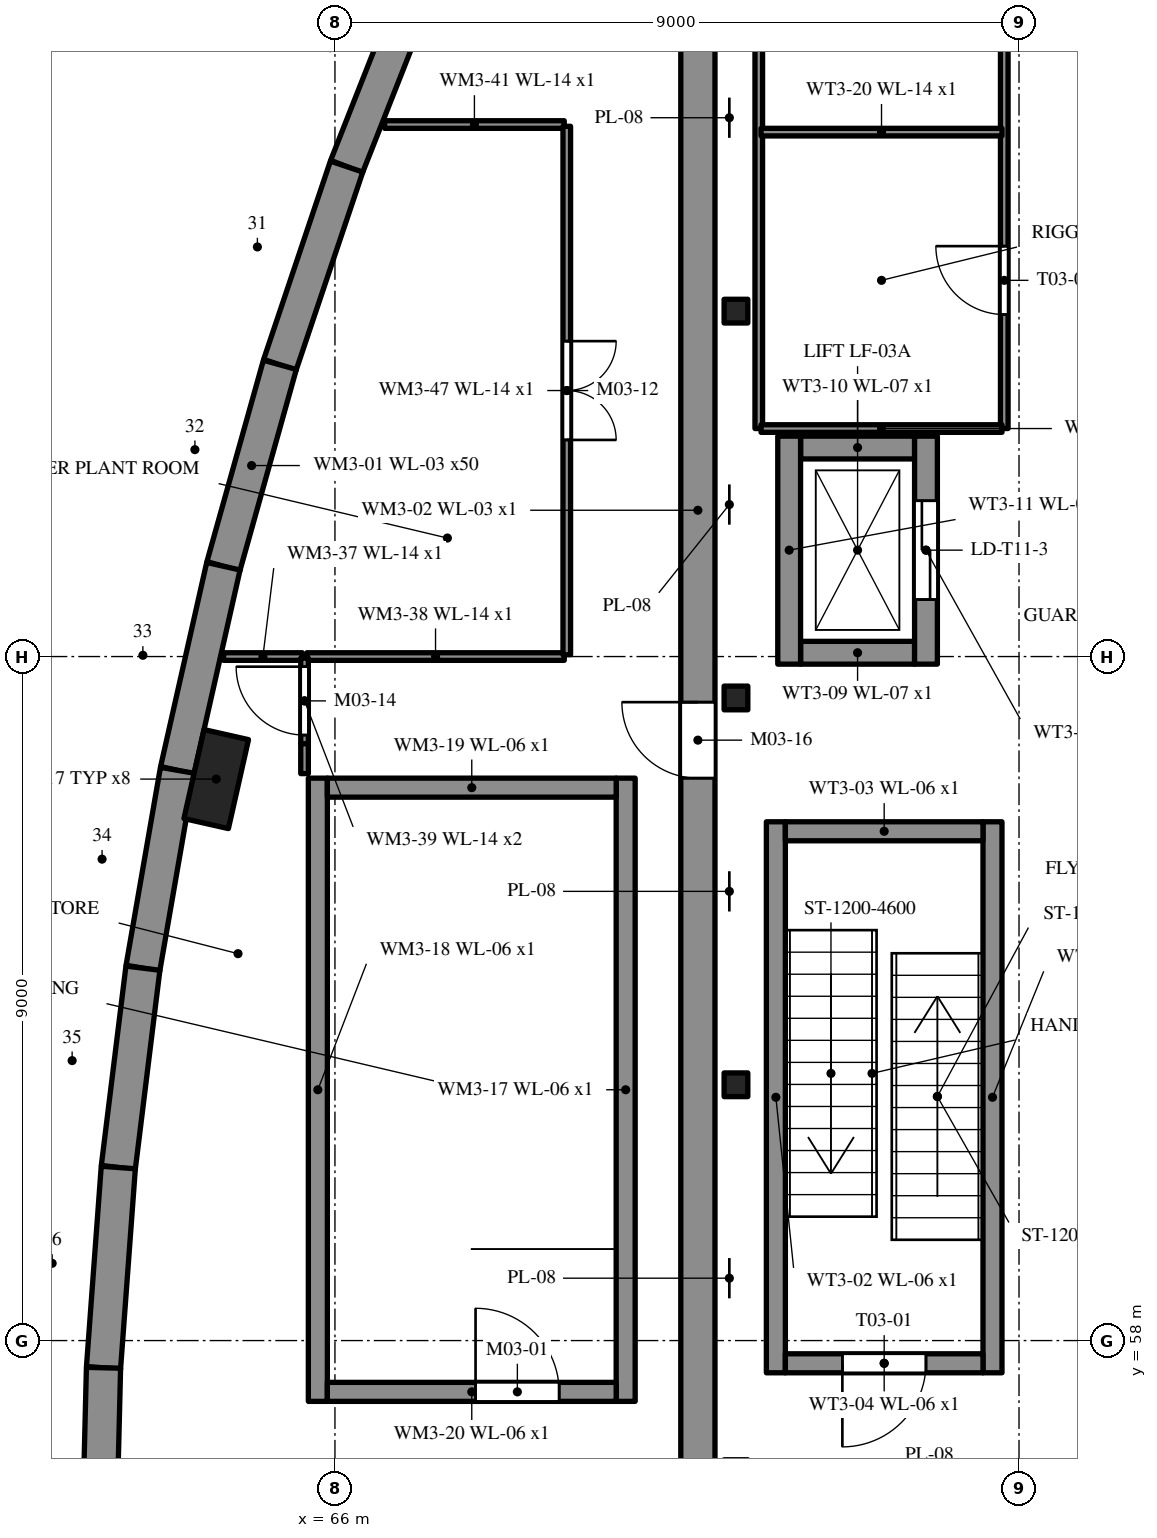
"""IFC4 building model, lengths in metres.
Left out: names, types, materials, properties, quantities, classifications, styles, units other than length and angle.
Written with IfcOpenShell. Run it as: python <this file> out.ifc"""

import sys

from ifc_helpers import new_model, si_unit, direction, frame, frame_2d, origin, origin_2d, place, context, subcontext, project, spatial, polyline, rectangle, i_section, outline, extrude, element, fill, save


model = new_model("IFC4")
c1 = context("Model", 3, precision=1e-05, world=origin(), true_north=direction((0.0, 1.0)))
c2 = subcontext(c1, "Body", "Model", "MODEL_VIEW")
j1 = project(units=[si_unit("LENGTHUNIT", "METRE"), si_unit("PLANEANGLEUNIT", "RADIAN")], contexts=[c1])
p1 = place(None, origin())
s1 = spatial("IfcSite", under=j1, at=p1, CompositionType="ELEMENT")
p2 = place(p1, origin())
s2 = spatial("IfcBuilding", under=s1, at=p2, CompositionType="ELEMENT")
p3 = place(p2, frame((0.0, 0.0, 14.8)))
s3 = spatial("IfcBuildingStorey", under=s2, at=p3, CompositionType="ELEMENT", Elevation=14.8)
p4 = place(p3, frame((67.163, 76.007, 0.0), z_axis=(0.0, 0.0, 1.0), x_axis=(-0.366920100653, -0.930252460215, 0.0)))
e1 = element("IfcWall", 1, at=p4, inside=s3, PredefinedType="SOLIDWALL", context=c2, shape_type="SweptSolid", body=[
    extrude(outline(polyline([(0.0, 0.0), (2.752, 0.0), (2.752, 2.931), (2.624, 2.973), (0.194, 3.768), (0.105, 3.797), (0.0, 3.742), (0.0, 0.0)])), frame((0.0, 0.225, 0.0), z_axis=(0.0, -1.0, 0.0), x_axis=(1.0, 0.0, 0.0)), (0.0, 0.0, 1.0), 0.45),
])
p5 = place(p3, frame((66.153, 73.447, 0.0), z_axis=(0.0, 0.0, 1.0), x_axis=(-0.318887614688, -0.947792534893, 0.0)))
e2 = element("IfcWall", 2, at=p5, inside=s3, PredefinedType="SOLIDWALL", context=c2, shape_type="SweptSolid", body=[
    extrude(outline(polyline([(0.0, 0.0), (2.752, 0.0), (2.752, 2.031), (2.742, 2.035), (2.6, 2.081), (0.114, 2.894), (0.0, 2.928), (0.0, 0.0)])), frame((0.0, 0.225, 0.0), z_axis=(0.0, -1.0, 0.0), x_axis=(1.0, 0.0, 0.0)), (0.0, 0.0, 1.0), 0.45),
])
p6 = place(p3, frame((65.275, 70.838, 0.0), z_axis=(0.0, 0.0, 1.0), x_axis=(-0.270008269196, -0.962858003324, 0.0)))
e3 = element("IfcWall", 3, at=p6, inside=s3, PredefinedType="SOLIDWALL", context=c2, shape_type="SweptSolid", body=[
    extrude(outline(polyline([(0.0, 0.0), (2.752, 0.0), (2.752, 2.921), (2.721, 2.911), (0.0, 2.027), (0.0, 0.0)])), frame((0.0, 0.225, 0.0), z_axis=(0.0, -1.0, 0.0), x_axis=(1.0, 0.0, 0.0)), (0.0, 0.0, 1.0), 0.45),
])
p7 = place(p3, frame((64.532, 68.188, 0.0), z_axis=(0.0, 0.0, 1.0), x_axis=(-0.220347996563, -0.975421324562, 0.0)))
e4 = element("IfcWall", 4, at=p7, inside=s3, PredefinedType="SOLIDWALL", context=c2, shape_type="SweptSolid", body=[
    extrude(outline(polyline([(0.0, 0.0), (2.752, 0.0), (2.752, 3.828), (2.723, 3.818), (2.672, 3.802), (2.622, 3.785), (0.0, 2.925), (0.0, 0.0)])), frame((0.0, 0.225, 0.0), z_axis=(0.0, -1.0, 0.0), x_axis=(1.0, 0.0, 0.0)), (0.0, 0.0, 1.0), 0.45),
])
p8 = place(p3, frame((63.926, 65.503, 0.0), z_axis=(0.0, 0.0, 1.0), x_axis=(-0.171196910379, -0.985236833394, 0.0)))
e5 = element("IfcWall", 5, at=p8, inside=s3, PredefinedType="SOLIDWALL", context=c2, shape_type="SweptSolid", body=[
    extrude(outline(polyline([(0.0, 0.0), (2.643, 0.0), (2.643, 2.97), (2.573, 2.994), (0.079, 3.843), (0.0, 3.832), (0.0, 0.0)])), frame((0.0, 0.225, 0.0), z_axis=(0.0, -1.0, 0.0), x_axis=(1.0, 0.0, 0.0)), (0.0, 0.0, 1.0), 0.45),
])
p9 = place(p3, frame((63.473, 62.9, 0.0), z_axis=(0.0, 0.0, 1.0), x_axis=(-0.122499610212, -0.992468561466, 0.0)))
e6 = element("IfcWall", 6, at=p9, inside=s3, PredefinedType="SOLIDWALL", context=c2, shape_type="SweptSolid", body=[
    extrude(outline(polyline([(0.0, 0.0), (2.643, 0.0), (2.643, 2.067), (2.556, 2.096), (0.057, 2.948), (0.0, 2.967), (0.0, 0.0)])), frame((0.0, 0.225, 0.0), z_axis=(0.0, -1.0, 0.0), x_axis=(1.0, 0.0, 0.0)), (0.0, 0.0, 1.0), 0.45),
])
p10 = place(p3, frame((63.15, 60.277, 0.0), z_axis=(0.0, 0.0, 1.0), x_axis=(-0.07363685767, -0.997285121313, 0.0)))
e7 = element("IfcWall", 7, at=p10, inside=s3, PredefinedType="SOLIDWALL", context=c2, shape_type="SweptSolid", body=[
    extrude(outline(polyline([(0.0, 0.0), (2.642, 0.0), (2.643, 2.97), (2.631, 2.966), (0.0, 2.069), (0.0, 0.0)])), frame((0.0, 0.225, 0.0), z_axis=(0.0, -1.0, 0.0), x_axis=(1.0, 0.0, 0.0)), (0.0, 0.0, 1.0), 0.45),
])
p11 = place(p3, frame((62.955, 57.642, 0.0), z_axis=(0.0, 0.0, 1.0), x_axis=(-0.024666736886, -0.999695729756, 0.0)))
e8 = element("IfcWall", 8, at=p11, inside=s3, PredefinedType="SOLIDWALL", context=c2, shape_type="SweptSolid", body=[
    extrude(outline(polyline([(0.0, 0.0), (2.643, 0.0), (2.643, 3.874), (2.573, 3.85), (0.0, 2.974), (0.0, 0.0)])), frame((0.0, 0.225, 0.0), z_axis=(0.0, -1.0, 0.0), x_axis=(1.0, 0.0, 0.0)), (0.0, 0.0, 1.0), 0.45),
])
p12 = place(p3, frame((70.775, 55.4, 0.0), z_axis=(0.0, 0.0, 1.0), x_axis=(0.0, 1.0, 0.0)))
e9 = element("IfcWall", 9, at=p12, inside=s3, PredefinedType="SOLIDWALL", context=c2, shape_type="SweptSolid", body=[
    extrude(rectangle(XDim=27.05, YDim=0.45, at=frame_2d((13.525, 0.0))), origin(), (0.0, 0.0, 1.0), 4.6),
])
p13 = place(p12, frame((10.0, 0.0, 0.0)))
e10 = element("IfcOpeningElement", 10, at=p13, cuts=e9, PredefinedType="OPENING", context=c2, shape_type="SweptSolid", body=[
    extrude(rectangle(XDim=1.0, YDim=2.1, at=frame_2d((0.5, 1.05))), frame((0.0, 0.235, 0.0), z_axis=(0.0, -1.0, 0.0), x_axis=(1.0, 0.0, 0.0)), (0.0, 0.0, 1.0), 0.47),
])
p14 = place(p3, frame((64.438, 65.388, 0.0), z_axis=(0.0, 0.0, 1.0), x_axis=(-0.220356962886, -0.975419299024, 0.0)))
e11 = element("IfcColumn", 11, at=p14, inside=s3, PredefinedType="PILASTER", context=c2, shape_type="SweptSolid", body=[
    extrude(rectangle(XDim=1.2, YDim=0.6, at=origin_2d()), origin(), (0.0, 0.0, 1.0), 3.071),
])
for number, where, z_axis, x_axis in (
    (12, (69.825, 57.2, 0.0), (0.0, 0.0, 1.0), (0.0, 1.0, 0.0)),
    (13, (65.775, 65.4, 0.0), (0.0, 0.0, 1.0), (0.0, -1.0, 0.0)),
):
    element("IfcWall", number, at=place(p3, frame(where, z_axis=z_axis, x_axis=x_axis)), inside=s3, PredefinedType="SHEAR", context=c2, shape_type="SweptSolid", body=[
        extrude(rectangle(XDim=8.2, YDim=0.25, at=frame_2d((4.1, 0.0))), origin(), (0.0, 0.0, 1.0), 3.294),
    ])
p15 = place(p3, frame((65.9, 65.275, 0.0), z_axis=(0.0, 0.0, 1.0), x_axis=(1.0, 0.0, 0.0)))
e14 = element("IfcWall", 14, at=p15, inside=s3, PredefinedType="SHEAR", context=c2, shape_type="SweptSolid", body=[
    extrude(rectangle(XDim=3.8, YDim=0.25, at=frame_2d((1.9, 0.0))), origin(), (0.0, 0.0, 1.0), 3.294),
])
p16 = place(p3, frame((69.7, 57.325, 0.0), z_axis=(0.0, 0.0, 1.0), x_axis=(-1.0, 0.0, 0.0)))
e15 = element("IfcWall", 15, at=p16, inside=s3, PredefinedType="SHEAR", context=c2, shape_type="SweptSolid", body=[
    extrude(rectangle(XDim=3.8, YDim=0.25, at=frame_2d((1.9, 0.0))), origin(), (0.0, 0.0, 1.0), 3.294),
])
p17 = place(p16, frame((0.75, 0.0, 0.0)))
e16 = element("IfcOpeningElement", 16, at=p17, cuts=e15, PredefinedType="OPENING", context=c2, shape_type="SweptSolid", body=[
    extrude(rectangle(XDim=1.1, YDim=2.1, at=frame_2d((0.55, 1.05))), frame((0.0, 0.135, 0.0), z_axis=(0.0, -1.0, 0.0), x_axis=(1.0, 0.0, 0.0)), (0.0, 0.0, 1.0), 0.27),
])
for number, where, z_axis, x_axis in (
    (17, (71.276, 61.365, 0.0), (0.0, 0.0, 1.0), (1.0, 0.0, 0.0)),
    (18, (71.276, 66.455, 0.0), (0.0, 0.0, 1.0), (1.0, 0.0, 0.0)),
    (19, (71.276, 71.545, 0.0), (0.0, 0.0, 1.0), (1.0, 0.0, 0.0)),
):
    element("IfcColumn", number, at=place(p3, frame(where, z_axis=z_axis, x_axis=x_axis)), inside=s3, PredefinedType="COLUMN", context=c2, shape_type="SweptSolid", body=[
        extrude(i_section(OverallWidth=0.312, OverallDepth=0.312, WebThickness=0.017, FlangeThickness=0.017, FilletRadius=0.016, at=origin_2d()), origin(), (0.0, 0.0, 1.0), 4.6),
    ])
for number, where, z_axis, x_axis in (
    (20, (74.651, 57.576, 0.0), (0.0, 0.0, 1.0), (0.0, 1.0, 0.0)),
    (21, (71.801, 64.826, 0.0), (0.0, 0.0, 1.0), (0.0, -1.0, 0.0)),
):
    element("IfcWall", number, at=place(p3, frame(where, z_axis=z_axis, x_axis=x_axis)), inside=s3, PredefinedType="SHEAR", context=c2, shape_type="SweptSolid", body=[
        extrude(rectangle(XDim=7.25, YDim=0.25, at=frame_2d((3.625, 0.0))), origin(), (0.0, 0.0, 1.0), 4.6),
    ])
p18 = place(p3, frame((71.926, 64.701, 0.0), z_axis=(0.0, 0.0, 1.0), x_axis=(1.0, 0.0, 0.0)))
e22 = element("IfcWall", 22, at=p18, inside=s3, PredefinedType="SHEAR", context=c2, shape_type="SweptSolid", body=[
    extrude(rectangle(XDim=2.6, YDim=0.25, at=frame_2d((1.3, 0.0))), origin(), (0.0, 0.0, 1.0), 4.6),
])
p19 = place(p3, frame((74.526, 57.701, 0.0), z_axis=(0.0, 0.0, 1.0), x_axis=(-1.0, 0.0, 0.0)))
e23 = element("IfcWall", 23, at=p19, inside=s3, PredefinedType="SHEAR", context=c2, shape_type="SweptSolid", body=[
    extrude(rectangle(XDim=2.6, YDim=0.25, at=frame_2d((1.3, 0.0))), origin(), (0.0, 0.0, 1.0), 4.6),
])
p20 = place(p19, frame((0.75, 0.0, 0.0)))
e24 = element("IfcOpeningElement", 24, at=p20, cuts=e23, PredefinedType="OPENING", context=c2, shape_type="SweptSolid", body=[
    extrude(rectangle(XDim=1.1, YDim=2.1, at=frame_2d((0.55, 1.05))), frame((0.0, 0.135, 0.0), z_axis=(0.0, -1.0, 0.0), x_axis=(1.0, 0.0, 0.0)), (0.0, 0.0, 1.0), 0.27),
])
for number, where, z_axis, x_axis in (
    (25, (72.126, 67.05, 0.0), (0.0, 0.0, 1.0), (1.0, 0.0, 0.0)),
    (26, (73.626, 69.75, 0.0), (0.0, 0.0, 1.0), (-1.0, 0.0, 0.0)),
):
    element("IfcWall", number, at=place(p3, frame(where, z_axis=z_axis, x_axis=x_axis)), inside=s3, PredefinedType="SHEAR", context=c2, shape_type="SweptSolid", body=[
        extrude(rectangle(XDim=1.5, YDim=0.3, at=frame_2d((0.75, 0.0))), origin(), (0.0, 0.0, 1.0), 4.6),
    ])
p21 = place(p3, frame((71.976, 66.9, 0.0), z_axis=(0.0, 0.0, 1.0), x_axis=(0.0, 1.0, 0.0)))
e27 = element("IfcWall", 27, at=p21, inside=s3, PredefinedType="SHEAR", context=c2, shape_type="SweptSolid", body=[
    extrude(rectangle(XDim=3.0, YDim=0.3, at=frame_2d((1.5, 0.0))), origin(), (0.0, 0.0, 1.0), 4.6),
])
p22 = place(p3, frame((73.776, 66.9, 0.0), z_axis=(0.0, 0.0, 1.0), x_axis=(0.0, 1.0, 0.0)))
e28 = element("IfcWall", 28, at=p22, inside=s3, PredefinedType="SHEAR", context=c2, shape_type="SweptSolid", body=[
    extrude(rectangle(XDim=3.0, YDim=0.3, at=frame_2d((1.5, 0.0))), origin(), (0.0, 0.0, 1.0), 4.6),
])
p23 = place(p22, frame((0.85, 0.0, 0.0)))
e29 = element("IfcOpeningElement", 29, at=p23, cuts=e28, PredefinedType="OPENING", context=c2, shape_type="SweptSolid", body=[
    extrude(rectangle(XDim=1.3, YDim=2.3, at=frame_2d((0.65, 1.15))), frame((0.0, 0.16, 0.0), z_axis=(0.0, -1.0, 0.0), x_axis=(1.0, 0.0, 0.0)), (0.0, 0.0, 1.0), 0.32),
])
p24 = place(p3, frame((71.576, 70.0, 0.0), z_axis=(0.0, 0.0, 1.0), x_axis=(0.0, 1.0, 0.0)))
e30 = element("IfcWall", 30, at=p24, inside=s3, PredefinedType="PARTITIONING", context=c2, shape_type="SweptSolid", body=[
    extrude(rectangle(XDim=11.644, YDim=0.1, at=frame_2d((5.822, 0.0))), origin(), (0.0, 0.0, 1.0), 4.04),
])
p25 = place(p3, frame((74.806, 70.0, 0.0), z_axis=(0.0, 0.0, 1.0), x_axis=(0.0, 1.0, 0.0)))
e31 = element("IfcWall", 31, at=p25, inside=s3, PredefinedType="PARTITIONING", context=c2, shape_type="SweptSolid", body=[
    extrude(rectangle(XDim=11.644, YDim=0.1, at=frame_2d((5.822, 0.0))), origin(), (0.0, 0.0, 1.0), 4.04),
])
p26 = place(p25, frame((1.5, 0.0, 0.0)))
e32 = element("IfcOpeningElement", 32, at=p26, cuts=e31, PredefinedType="OPENING", context=c2, shape_type="SweptSolid", body=[
    extrude(rectangle(XDim=0.9, YDim=2.1, at=frame_2d((0.45, 1.05))), frame((0.0, 0.06, 0.0), z_axis=(0.0, -1.0, 0.0), x_axis=(1.0, 0.0, 0.0)), (0.0, 0.0, 1.0), 0.12),
])
p27 = place(p25, frame((5.4, 0.0, 0.0)))
e33 = element("IfcOpeningElement", 33, at=p27, cuts=e31, PredefinedType="OPENING", context=c2, shape_type="SweptSolid", body=[
    extrude(rectangle(XDim=0.9, YDim=2.1, at=frame_2d((0.45, 1.05))), frame((0.0, 0.06, 0.0), z_axis=(0.0, -1.0, 0.0), x_axis=(1.0, 0.0, 0.0)), (0.0, 0.0, 1.0), 0.12),
])
p28 = place(p25, frame((9.272, 0.0, 0.0)))
e34 = element("IfcOpeningElement", 34, at=p28, cuts=e31, PredefinedType="OPENING", context=c2, shape_type="SweptSolid", body=[
    extrude(rectangle(XDim=0.9, YDim=2.1, at=frame_2d((0.45, 1.05))), frame((0.0, 0.06, 0.0), z_axis=(0.0, -1.0, 0.0), x_axis=(1.0, 0.0, 0.0)), (0.0, 0.0, 1.0), 0.12),
])
for number, where, z_axis, x_axis in (
    (35, (71.606, 70.0, 0.0), (0.0, 0.0, 1.0), (1.0, 0.0, 0.0)),
    (36, (71.606, 73.9, 0.0), (0.0, 0.0, 1.0), (1.0, 0.0, 0.0)),
):
    element("IfcWall", number, at=place(p3, frame(where, z_axis=z_axis, x_axis=x_axis)), inside=s3, PredefinedType="PARTITIONING", context=c2, shape_type="SweptSolid", body=[
        extrude(rectangle(XDim=3.17, YDim=0.1, at=frame_2d((1.585, 0.0))), origin(), (0.0, 0.0, 1.0), 4.04),
    ])
p29 = place(p3, frame((65.57, 67.0, 0.0), z_axis=(0.0, 0.0, 1.0), x_axis=(-1.0, 0.0, 0.0)))
e37 = element("IfcWall", 37, at=p29, inside=s3, PredefinedType="PARTITIONING", context=c2, shape_type="SweptSolid", body=[
    extrude(outline(polyline([(0.0, 0.0), (1.035, 0.0), (1.045, 3.542), (0.784, 3.673), (0.523, 3.803), (0.261, 3.933), (0.0, 4.063), (0.0, 0.0)])), frame((0.0, 0.05, 0.0), z_axis=(0.0, -1.0, 0.0), x_axis=(1.0, 0.0, 0.0)), (0.0, 0.0, 1.0), 0.1),
])
p30 = place(p3, frame((69.017, 67.0, 0.0), z_axis=(0.0, 0.0, 1.0), x_axis=(-1.0, 0.0, 0.0)))
e38 = element("IfcWall", 38, at=p30, inside=s3, PredefinedType="PARTITIONING", context=c2, shape_type="SweptSolid", body=[
    extrude(outline(polyline([(0.0, 0.0), (3.387, 0.0), (3.397, 4.088), (3.136, 4.218), (2.874, 4.348), (2.613, 4.478), (2.352, 4.609), (2.09, 4.739), (1.829, 4.869), (1.568, 4.999), (1.307, 5.129), (1.045, 5.259), (0.784, 5.389), (0.523, 5.52), (0.261, 5.65), (0.0, 5.78), (0.0, 0.0)])), frame((0.0, 0.05, 0.0), z_axis=(0.0, -1.0, 0.0), x_axis=(1.0, 0.0, 0.0)), (0.0, 0.0, 1.0), 0.1),
])
p31 = place(p3, frame((65.6, 66.98, 0.0), z_axis=(0.0, 0.0, 1.0), x_axis=(0.0, -1.0, 0.0)))
e39 = element("IfcWall", 39, at=p31, inside=s3, PredefinedType="PARTITIONING", context=c2, shape_type="SweptSolid", body=[
    extrude(outline(polyline([(0.0, 0.0), (1.126, 0.0), (1.127, 4.586), (0.845, 4.46), (0.563, 4.334), (0.282, 4.208), (0.0, 4.082), (0.0, 0.0)])), frame((0.0, 0.05, 0.0), z_axis=(0.0, -1.0, 0.0), x_axis=(1.0, 0.0, 0.0)), (0.0, 0.0, 1.0), 0.1),
])
p32 = place(p31, frame((0.113, 0.0, 0.0)))
e40 = element("IfcOpeningElement", 40, at=p32, cuts=e39, PredefinedType="OPENING", context=c2, shape_type="SweptSolid", body=[
    extrude(rectangle(XDim=0.9, YDim=2.1, at=frame_2d((0.45, 1.05))), frame((0.0, 0.06, 0.0), z_axis=(0.0, -1.0, 0.0), x_axis=(1.0, 0.0, 0.0)), (0.0, 0.0, 1.0), 0.12),
])
p33 = place(p3, frame((65.6, 65.854, 0.0), z_axis=(0.0, 0.0, 1.0), x_axis=(0.0, -1.0, 0.0)))
e41 = element("IfcWall", 41, at=p33, inside=s3, PredefinedType="PARTITIONING", context=c2, shape_type="SweptSolid", body=[
    extrude(rectangle(XDim=0.394, YDim=0.1, at=frame_2d((0.197, 0.0))), origin(), (0.0, 0.0, 1.0), 1.996),
])
p34 = place(p3, frame((66.653, 74.0, 0.0), z_axis=(0.0, 0.0, 1.0), x_axis=(1.0, 0.0, 0.0)))
e42 = element("IfcWall", 42, at=p34, inside=s3, PredefinedType="PARTITIONING", context=c2, shape_type="SweptSolid", body=[
    extrude(outline(polyline([(0.0, 0.0), (2.364, 0.0), (2.374, 4.939), (2.11, 4.767), (1.846, 4.595), (1.582, 4.422), (1.319, 4.25), (1.055, 4.078), (0.791, 3.906), (0.527, 3.733), (0.264, 3.561), (0.0, 3.389), (0.0, 0.0)])), frame((0.0, 0.05, 0.0), z_axis=(0.0, -1.0, 0.0), x_axis=(1.0, 0.0, 0.0)), (0.0, 0.0, 1.0), 0.1),
])
p35 = place(p3, frame((69.05, 73.977, 0.0), z_axis=(0.0, 0.0, 1.0), x_axis=(0.0, -1.0, 0.0)))
e43 = element("IfcWall", 43, at=p35, inside=s3, PredefinedType="PARTITIONING", context=c2, shape_type="SweptSolid", body=[
    extrude(outline(polyline([(0.0, 0.0), (6.954, 0.0), (6.954, 5.781), (6.696, 5.666), (6.439, 5.55), (6.181, 5.426), (5.924, 5.303), (5.666, 5.18), (5.408, 5.057), (5.151, 4.933), (4.893, 4.81), (4.636, 4.687), (4.378, 4.564), (4.121, 4.497), (3.863, 4.522), (3.606, 4.546), (3.348, 4.571), (3.091, 4.595), (2.833, 4.619), (2.575, 4.644), (2.318, 4.668), (2.06, 4.694), (1.803, 4.727), (1.545, 4.76), (1.288, 4.792), (1.03, 4.825), (0.773, 4.858), (0.515, 4.89), (0.258, 4.923), (0.0, 4.952), (0.0, 0.0)])), frame((0.0, 0.05, 0.0), z_axis=(0.0, -1.0, 0.0), x_axis=(1.0, 0.0, 0.0)), (0.0, 0.0, 1.0), 0.1),
])
p36 = place(p35, frame((2.827, 0.0, 0.0)))
e44 = element("IfcOpeningElement", 44, at=p36, cuts=e43, PredefinedType="OPENING", context=c2, shape_type="SweptSolid", body=[
    extrude(rectangle(XDim=1.3, YDim=2.1, at=frame_2d((0.65, 1.05))), frame((0.0, 0.06, 0.0), z_axis=(0.0, -1.0, 0.0), x_axis=(1.0, 0.0, 0.0)), (0.0, 0.0, 1.0), 0.12),
])
p37 = place(p17, frame((1.1, 0.0, 0.0), z_axis=(0.0, 0.0, 1.0), x_axis=(-1.0, 0.0, 0.0)))
e45 = element("IfcDoor", 45, at=p37, inside=s3, OperationType="SINGLE_SWING_LEFT", PredefinedType="DOOR", context=c2, shape_type="SweptSolid", body=[
    extrude(rectangle(XDim=1.1, YDim=2.1, at=frame_2d((0.55, 1.05))), frame((0.0, 0.025, 0.0), z_axis=(0.0, -1.0, 0.0), x_axis=(1.0, 0.0, 0.0)), (0.0, 0.0, 1.0), 0.05),
])
fill(e16, e45)
p38 = place(p20, origin())
e46 = element("IfcDoor", 46, at=p38, inside=s3, OperationType="SINGLE_SWING_RIGHT", PredefinedType="DOOR", context=c2, shape_type="SweptSolid", body=[
    extrude(rectangle(XDim=1.1, YDim=2.1, at=frame_2d((0.55, 1.05))), frame((0.0, 0.025, 0.0), z_axis=(0.0, -1.0, 0.0), x_axis=(1.0, 0.0, 0.0)), (0.0, 0.0, 1.0), 0.05),
])
fill(e24, e46)
p39 = place(p23, origin())
e47 = element("IfcDoor", 47, at=p39, inside=s3, OperationType="SLIDING_TO_LEFT", PredefinedType="DOOR", context=c2, shape_type="SweptSolid", body=[
    extrude(rectangle(XDim=1.3, YDim=2.3, at=frame_2d((0.65, 1.15))), frame((0.0, 0.025, 0.0), z_axis=(0.0, -1.0, 0.0), x_axis=(1.0, 0.0, 0.0)), (0.0, 0.0, 1.0), 0.05),
])
fill(e29, e47)
p40 = place(p26, origin())
e48 = element("IfcDoor", 48, at=p40, inside=s3, OperationType="SINGLE_SWING_RIGHT", PredefinedType="DOOR", context=c2, shape_type="SweptSolid", body=[
    extrude(rectangle(XDim=0.9, YDim=2.1, at=frame_2d((0.45, 1.05))), frame((0.0, 0.025, 0.0), z_axis=(0.0, -1.0, 0.0), x_axis=(1.0, 0.0, 0.0)), (0.0, 0.0, 1.0), 0.05),
])
fill(e32, e48)
p41 = place(p36, origin())
e49 = element("IfcDoor", 49, at=p41, inside=s3, OperationType="DOUBLE_DOOR_SINGLE_SWING", PredefinedType="DOOR", context=c2, shape_type="SweptSolid", body=[
    extrude(rectangle(XDim=1.3, YDim=2.1, at=frame_2d((0.65, 1.05))), frame((0.0, 0.025, 0.0), z_axis=(0.0, -1.0, 0.0), x_axis=(1.0, 0.0, 0.0)), (0.0, 0.0, 1.0), 0.05),
])
fill(e44, e49)
p42 = place(p32, frame((0.9, 0.0, 0.0), z_axis=(0.0, 0.0, 1.0), x_axis=(-1.0, 0.0, 0.0)))
e50 = element("IfcDoor", 50, at=p42, inside=s3, OperationType="SINGLE_SWING_RIGHT", PredefinedType="DOOR", context=c2, shape_type="SweptSolid", body=[
    extrude(rectangle(XDim=0.9, YDim=2.1, at=frame_2d((0.45, 1.05))), frame((0.0, 0.025, 0.0), z_axis=(0.0, -1.0, 0.0), x_axis=(1.0, 0.0, 0.0)), (0.0, 0.0, 1.0), 0.05),
])
fill(e40, e50)
p43 = place(p13, origin())
e51 = element("IfcDoor", 51, at=p43, inside=s3, OperationType="SINGLE_SWING_RIGHT", PredefinedType="DOOR", context=c2, shape_type="SweptSolid", body=[
    extrude(rectangle(XDim=1.0, YDim=2.1, at=frame_2d((0.5, 1.05))), frame((0.0, 0.025, 0.0), z_axis=(0.0, -1.0, 0.0), x_axis=(1.0, 0.0, 0.0)), (0.0, 0.0, 1.0), 0.05),
])
fill(e10, e51)
save(model, sys.argv[1])
